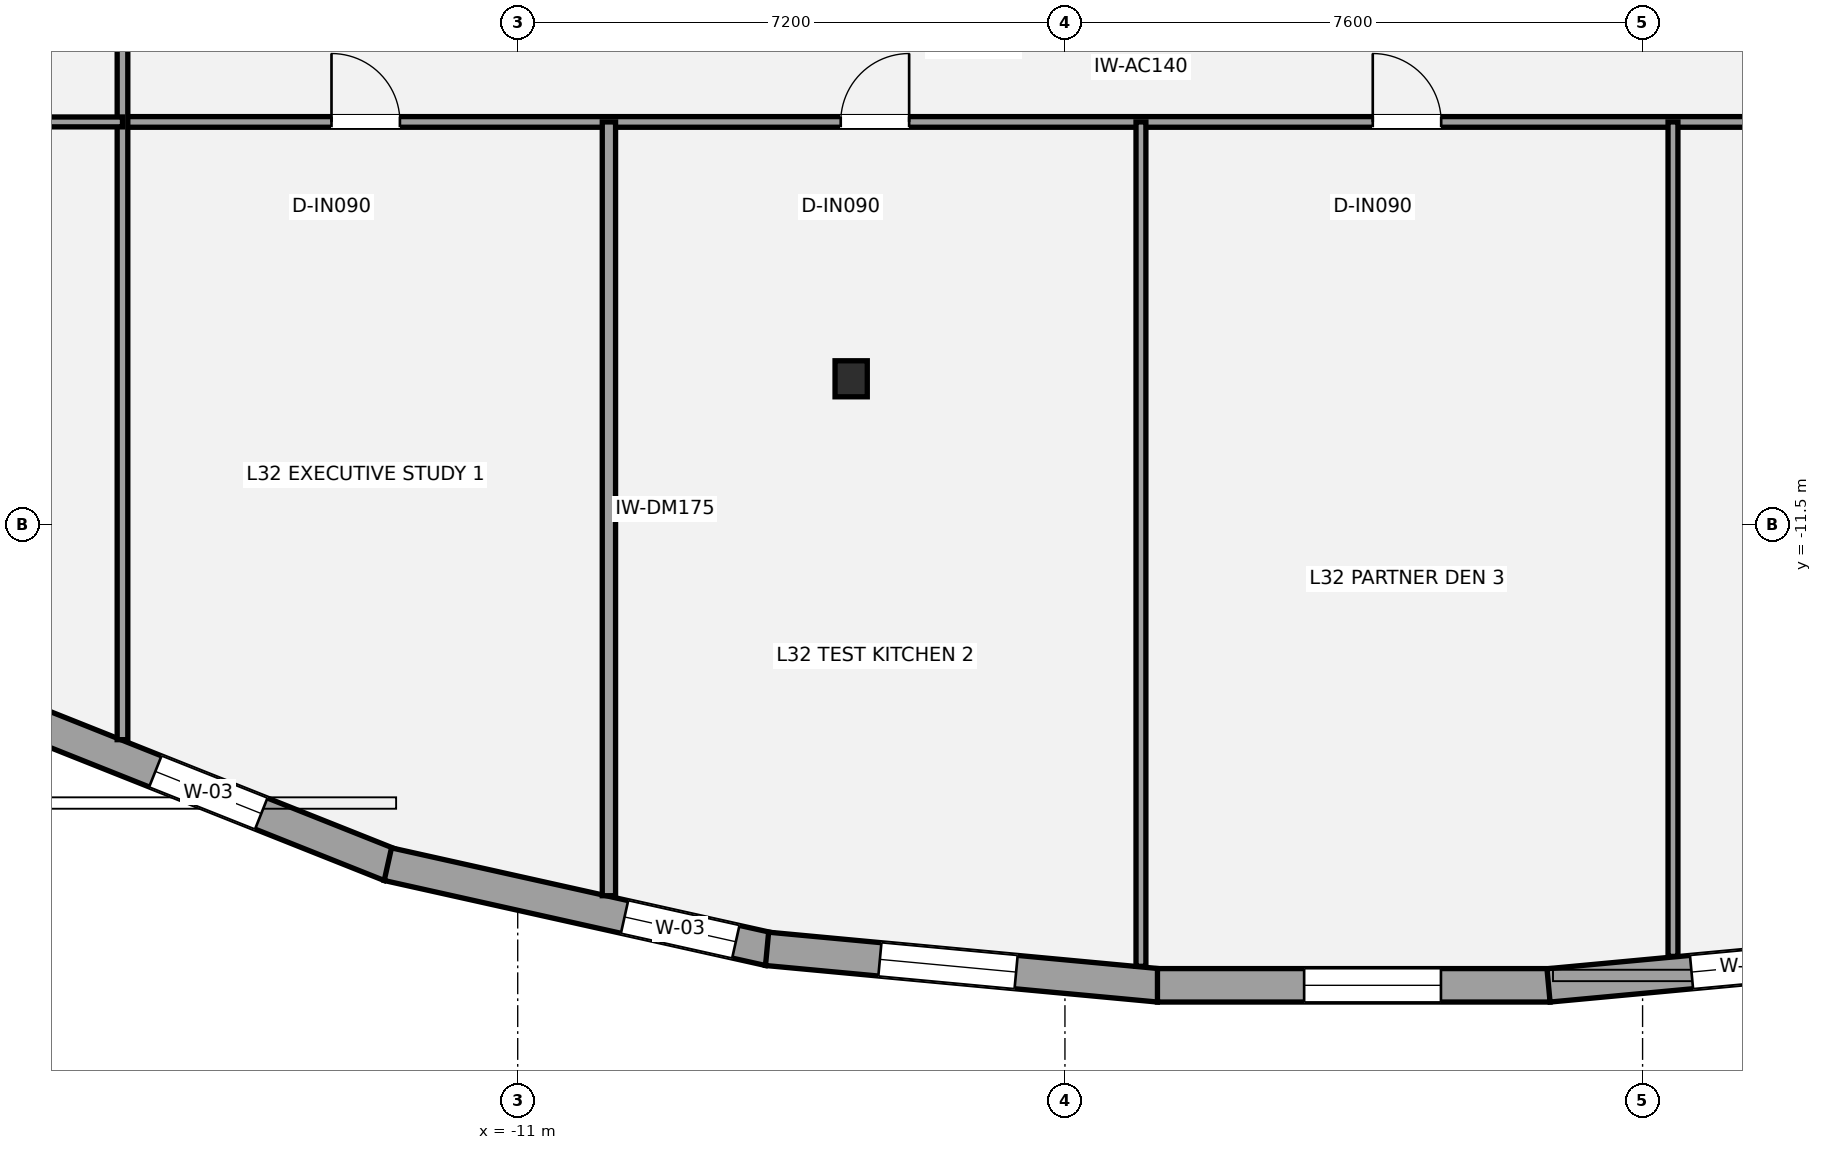
"""IFC4 building model, lengths in metres.
Left out: names, types, materials, properties, quantities, classifications, styles, units other than length and angle.
Written with IfcOpenShell. Run it as: python <this file> out.ifc"""

import sys

from ifc_helpers import new_model, si_unit, direction, frame, frame_2d, origin, origin_2d, place, context, subcontext, project, spatial, rectangle, i_section, extrude, element, fill, save


model = new_model("IFC4")
c1 = context("Model", 3, precision=1e-05, world=origin(), true_north=direction((0.0, 1.0)))
c2 = subcontext(c1, "Body", "Model", "MODEL_VIEW")
j1 = project(units=[si_unit("LENGTHUNIT", "METRE"), si_unit("PLANEANGLEUNIT", "RADIAN")], contexts=[c1])
p1 = place(None, origin())
s1 = spatial("IfcSite", under=j1, at=p1, CompositionType="ELEMENT")
p2 = place(p1, origin())
s2 = spatial("IfcBuilding", under=s1, at=p2, CompositionType="ELEMENT")
p3 = place(p2, frame((0.0, 0.0, 121.1)))
s3 = spatial("IfcBuildingStorey", under=s2, at=p3, CompositionType="ELEMENT", Elevation=121.1)
p4 = place(p3, frame((-6.613, -9.579, 0.0), z_axis=(0.0, 0.0, 1.0), x_axis=(1.0, 0.0, 0.0)))
e1 = element("IfcColumn", 1, at=p4, inside=s3, PredefinedType="COLUMN", context=c2, shape_type="SweptSolid", body=[
    extrude(i_section(OverallWidth=0.424, OverallDepth=0.474, WebThickness=0.048, FlangeThickness=0.077, at=origin_2d()), origin(), (0.0, 0.0, 1.0), 3.5),
])
p5 = place(p3, frame((-17.241, -14.164, 0.0), z_axis=(0.0, 0.0, 1.0), x_axis=(-0.827707240431, 0.56116015908, 0.0)))
e2 = element("IfcWall", 2, at=p5, inside=s3, PredefinedType="STANDARD", context=c2, shape_type="SweptSolid", body=[
    extrude(rectangle(XDim=4.584, YDim=0.44, at=frame_2d((2.292, 0.0))), origin(), (0.0, 0.0, 1.0), 2.528),
])
p6 = place(p5, frame((0.995, 0.0, 0.65)))
e3 = element("IfcOpeningElement", 3, at=p6, cuts=e2, PredefinedType="OPENING", context=c2, shape_type="SweptSolid", body=[
    extrude(rectangle(XDim=1.8, YDim=1.7, at=frame_2d((0.9, 0.85))), frame((0.0, 0.23, 0.0), z_axis=(0.0, -1.0, 0.0), x_axis=(1.0, 0.0, 0.0)), (0.0, 0.0, 1.0), 0.46),
])
p7 = place(p3, frame((-12.675, -15.976, 0.0), z_axis=(0.0, 0.0, 1.0), x_axis=(-0.929089765506, 0.369854305953, 0.0)))
e4 = element("IfcWall", 4, at=p7, inside=s3, PredefinedType="STANDARD", context=c2, shape_type="SweptSolid", body=[
    extrude(rectangle(XDim=4.961, YDim=0.44, at=frame_2d((2.48, 0.0))), origin(), (0.0, 0.0, 1.0), 2.528),
])
p8 = place(p7, frame((1.829, 0.0, 0.65)))
e5 = element("IfcOpeningElement", 5, at=p8, cuts=e4, PredefinedType="OPENING", context=c2, shape_type="SweptSolid", body=[
    extrude(rectangle(XDim=1.5, YDim=1.7, at=frame_2d((0.75, 0.85))), frame((0.0, 0.23, 0.0), z_axis=(0.0, -1.0, 0.0), x_axis=(1.0, 0.0, 0.0)), (0.0, 0.0, 1.0), 0.46),
])
p9 = place(p3, frame((-7.692, -17.083, 0.0), z_axis=(0.0, 0.0, 1.0), x_axis=(-0.976058355685, 0.217508818896, 0.0)))
e6 = element("IfcWall", 6, at=p9, inside=s3, PredefinedType="STANDARD", context=c2, shape_type="SweptSolid", body=[
    extrude(rectangle(XDim=5.14, YDim=0.44, at=frame_2d((2.57, 0.0))), origin(), (0.0, 0.0, 1.0), 2.528),
])
p10 = place(p9, frame((0.449, 0.0, 0.65)))
e7 = element("IfcOpeningElement", 7, at=p10, cuts=e6, PredefinedType="OPENING", context=c2, shape_type="SweptSolid", body=[
    extrude(rectangle(XDim=1.5, YDim=1.7, at=frame_2d((0.75, 0.85))), frame((0.0, 0.23, 0.0), z_axis=(0.0, -1.0, 0.0), x_axis=(1.0, 0.0, 0.0)), (0.0, 0.0, 1.0), 0.46),
])
p11 = place(p3, frame((-2.562, -17.56, 0.0), z_axis=(0.0, 0.0, 1.0), x_axis=(-0.995683099415, 0.092817916047, 0.0)))
e8 = element("IfcWall", 8, at=p11, inside=s3, PredefinedType="STANDARD", context=c2, shape_type="SweptSolid", body=[
    extrude(rectangle(XDim=5.179, YDim=0.44, at=frame_2d((2.59, 0.0))), origin(), (0.0, 0.0, 1.0), 2.528),
])
p12 = place(p11, frame((1.888, 0.0, 0.65)))
e9 = element("IfcOpeningElement", 9, at=p12, cuts=e8, PredefinedType="OPENING", context=c2, shape_type="SweptSolid", body=[
    extrude(rectangle(XDim=1.8, YDim=1.7, at=frame_2d((0.9, 0.85))), frame((0.0, 0.23, 0.0), z_axis=(0.0, -1.0, 0.0), x_axis=(1.0, 0.0, 0.0)), (0.0, 0.0, 1.0), 0.46),
])
p13 = place(p3, frame((2.583, -17.559, 0.0), z_axis=(0.0, 0.0, 1.0), x_axis=(-1.0, 0.0, 0.0)))
e10 = element("IfcWall", 10, at=p13, inside=s3, PredefinedType="STANDARD", context=c2, shape_type="SweptSolid", body=[
    extrude(rectangle(XDim=5.166, YDim=0.44, at=frame_2d((2.583, 0.0))), origin(), (0.0, 0.0, 1.0), 2.528),
])
p14 = place(p13, frame((1.436, 0.0, 0.65)))
e11 = element("IfcOpeningElement", 11, at=p14, cuts=e10, PredefinedType="OPENING", context=c2, shape_type="SweptSolid", body=[
    extrude(rectangle(XDim=1.8, YDim=1.7, at=frame_2d((0.9, 0.85))), frame((0.0, 0.23, 0.0), z_axis=(0.0, -1.0, 0.0), x_axis=(1.0, 0.0, 0.0)), (0.0, 0.0, 1.0), 0.46),
])
p15 = place(p3, frame((7.719, -17.079, 0.0), z_axis=(0.0, 0.0, 1.0), x_axis=(-0.995683099415, -0.092817916047, 0.0)))
e12 = element("IfcWall", 12, at=p15, inside=s3, PredefinedType="STANDARD", context=c2, shape_type="SweptSolid", body=[
    extrude(rectangle(XDim=5.179, YDim=0.44, at=frame_2d((2.59, 0.0))), origin(), (0.0, 0.0, 1.0), 2.528),
])
p16 = place(p15, frame((1.89, 0.0, 0.85)))
e13 = element("IfcOpeningElement", 13, at=p16, cuts=e12, PredefinedType="OPENING", context=c2, shape_type="SweptSolid", body=[
    extrude(rectangle(XDim=1.4, YDim=1.55, at=frame_2d((0.7, 0.775))), frame((0.0, 0.23, 0.0), z_axis=(0.0, -1.0, 0.0), x_axis=(1.0, 0.0, 0.0)), (0.0, 0.0, 1.0), 0.46),
])
p17 = place(p3, frame((-16.2, -6.2, 0.0), z_axis=(0.0, 0.0, 1.0), x_axis=(1.0, 0.0, 0.0)))
e14 = element("IfcWall", 14, at=p17, inside=s3, PredefinedType="PARTITIONING", context=c2, shape_type="SweptSolid", body=[
    extrude(rectangle(XDim=34.0, YDim=0.14, at=frame_2d((17.0, 0.0))), origin(), (0.0, 0.0, 1.0), 2.688),
])
p18 = place(p17, frame((2.75, 0.0, 0.0)))
e15 = element("IfcOpeningElement", 15, at=p18, cuts=e14, PredefinedType="OPENING", context=c2, shape_type="SweptSolid", body=[
    extrude(rectangle(XDim=0.9, YDim=2.1, at=frame_2d((0.45, 1.05))), frame((0.0, 0.08, 0.0), z_axis=(0.0, -1.0, 0.0), x_axis=(1.0, 0.0, 0.0)), (0.0, 0.0, 1.0), 0.16),
])
p19 = place(p17, frame((9.45, 0.0, 0.0)))
e16 = element("IfcOpeningElement", 16, at=p19, cuts=e14, PredefinedType="OPENING", context=c2, shape_type="SweptSolid", body=[
    extrude(rectangle(XDim=0.9, YDim=2.1, at=frame_2d((0.45, 1.05))), frame((0.0, 0.08, 0.0), z_axis=(0.0, -1.0, 0.0), x_axis=(1.0, 0.0, 0.0)), (0.0, 0.0, 1.0), 0.16),
])
p20 = place(p17, frame((16.45, 0.0, 0.0)))
e17 = element("IfcOpeningElement", 17, at=p20, cuts=e14, PredefinedType="OPENING", context=c2, shape_type="SweptSolid", body=[
    extrude(rectangle(XDim=0.9, YDim=2.1, at=frame_2d((0.45, 1.05))), frame((0.0, 0.08, 0.0), z_axis=(0.0, -1.0, 0.0), x_axis=(1.0, 0.0, 0.0)), (0.0, 0.0, 1.0), 0.16),
])
p21 = place(p17, frame((22.95, 0.0, 0.0)))
e18 = element("IfcOpeningElement", 18, at=p21, cuts=e14, PredefinedType="OPENING", context=c2, shape_type="SweptSolid", body=[
    extrude(rectangle(XDim=0.9, YDim=2.1, at=frame_2d((0.45, 1.05))), frame((0.0, 0.08, 0.0), z_axis=(0.0, -1.0, 0.0), x_axis=(1.0, 0.0, 0.0)), (0.0, 0.0, 1.0), 0.16),
])
p22 = place(p17, frame((29.45, 0.0, 0.0)))
e19 = element("IfcOpeningElement", 19, at=p22, cuts=e14, PredefinedType="OPENING", context=c2, shape_type="SweptSolid", body=[
    extrude(rectangle(XDim=1.5, YDim=2.15, at=frame_2d((0.75, 1.075))), frame((0.0, 0.08, 0.0), z_axis=(0.0, -1.0, 0.0), x_axis=(1.0, 0.0, 0.0)), (0.0, 0.0, 1.0), 0.16),
])
p23 = place(p3, frame((-16.2, -14.327, 0.0), z_axis=(0.0, 0.0, 1.0), x_axis=(0.0, 1.0, 0.0)))
e20 = element("IfcWall", 20, at=p23, inside=s3, PredefinedType="PARTITIONING", context=c2, shape_type="SweptSolid", body=[
    extrude(rectangle(XDim=21.877, YDim=0.14, at=frame_2d((10.938, 0.0))), origin(), (0.0, 0.0, 1.0), 2.763),
])
p24 = place(p23, frame((10.177, 0.0, 0.0)))
e21 = element("IfcOpeningElement", 21, at=p24, cuts=e20, PredefinedType="OPENING", context=c2, shape_type="SweptSolid", body=[
    extrude(rectangle(XDim=0.9, YDim=2.1, at=frame_2d((0.45, 1.05))), frame((0.0, 0.08, 0.0), z_axis=(0.0, -1.0, 0.0), x_axis=(1.0, 0.0, 0.0)), (0.0, 0.0, 1.0), 0.16),
])
p25 = place(p23, frame((14.978, 0.0, 0.0)))
e22 = element("IfcOpeningElement", 22, at=p25, cuts=e20, PredefinedType="OPENING", context=c2, shape_type="SweptSolid", body=[
    extrude(rectangle(XDim=0.9, YDim=2.1, at=frame_2d((0.45, 1.05))), frame((0.0, 0.08, 0.0), z_axis=(0.0, -1.0, 0.0), x_axis=(1.0, 0.0, 0.0)), (0.0, 0.0, 1.0), 0.16),
])
p26 = place(p23, frame((19.353, 0.0, 0.0)))
e23 = element("IfcOpeningElement", 23, at=p26, cuts=e20, PredefinedType="OPENING", context=c2, shape_type="SweptSolid", body=[
    extrude(rectangle(XDim=0.9, YDim=2.1, at=frame_2d((0.45, 1.05))), frame((0.0, 0.08, 0.0), z_axis=(0.0, -1.0, 0.0), x_axis=(1.0, 0.0, 0.0)), (0.0, 0.0, 1.0), 0.16),
])
p27 = place(p3, frame((-9.8, -16.38, 0.0), z_axis=(0.0, 0.0, 1.0), x_axis=(0.0, 1.0, 0.0)))
e24 = element("IfcWall", 24, at=p27, inside=s3, PredefinedType="PARTITIONING", context=c2, shape_type="SweptSolid", body=[
    extrude(rectangle(XDim=10.18, YDim=0.175, at=frame_2d((5.09, 0.0))), origin(), (0.0, 0.0, 1.0), 3.31),
])
p28 = place(p3, frame((-2.8, -17.309, 0.0), z_axis=(0.0, 0.0, 1.0), x_axis=(0.0, 1.0, 0.0)))
e25 = element("IfcWall", 25, at=p28, inside=s3, PredefinedType="PARTITIONING", context=c2, shape_type="SweptSolid", body=[
    extrude(rectangle(XDim=11.109, YDim=0.13, at=frame_2d((5.554, 0.0))), origin(), (0.0, 0.0, 1.0), 2.763),
])
p29 = place(p3, frame((4.2, -17.178, 0.0), z_axis=(0.0, 0.0, 1.0), x_axis=(0.0, 1.0, 0.0)))
e26 = element("IfcWall", 26, at=p29, inside=s3, PredefinedType="PARTITIONING", context=c2, shape_type="SweptSolid", body=[
    extrude(rectangle(XDim=10.978, YDim=0.13, at=frame_2d((5.489, 0.0))), origin(), (0.0, 0.0, 1.0), 2.763),
])
p30 = place(p3, frame((-24.554, -6.2, 0.0), z_axis=(0.0, 0.0, 1.0), x_axis=(1.0, 0.0, 0.0)))
e27 = element("IfcWall", 27, at=p30, inside=s3, PredefinedType="PARTITIONING", context=c2, shape_type="SweptSolid", body=[
    extrude(rectangle(XDim=8.354, YDim=0.13, at=frame_2d((4.177, 0.0))), origin(), (0.0, 0.0, 1.0), 2.688),
])
p31 = place(p30, frame((0.99, 0.0, 0.0)))
e28 = element("IfcOpeningElement", 28, at=p31, cuts=e27, PredefinedType="OPENING", context=c2, shape_type="SweptSolid", body=[
    extrude(rectangle(XDim=0.9, YDim=2.1, at=frame_2d((0.45, 1.05))), frame((0.0, 0.075, 0.0), z_axis=(0.0, -1.0, 0.0), x_axis=(1.0, 0.0, 0.0)), (0.0, 0.0, 1.0), 0.15),
])
p32 = place(p8, origin())
e29 = element("IfcWindow", 29, at=p32, inside=s3, PartitioningType="SINGLE_PANEL", PredefinedType="WINDOW", context=c2, shape_type="SweptSolid", body=[
    extrude(rectangle(XDim=1.5, YDim=1.7, at=frame_2d((0.75, 0.85))), frame((0.0, -0.01, 0.0), z_axis=(0.0, -1.0, 0.0), x_axis=(1.0, 0.0, 0.0)), (0.0, 0.0, 1.0), 0.06),
])
fill(e5, e29)
p33 = place(p10, origin())
e30 = element("IfcWindow", 30, at=p33, inside=s3, PartitioningType="SINGLE_PANEL", PredefinedType="WINDOW", context=c2, shape_type="SweptSolid", body=[
    extrude(rectangle(XDim=1.5, YDim=1.7, at=frame_2d((0.75, 0.85))), frame((0.0, -0.01, 0.0), z_axis=(0.0, -1.0, 0.0), x_axis=(1.0, 0.0, 0.0)), (0.0, 0.0, 1.0), 0.06),
])
fill(e7, e30)
p34 = place(p12, origin())
e31 = element("IfcWindow", 31, at=p34, inside=s3, PartitioningType="SINGLE_PANEL", PredefinedType="WINDOW", context=c2, shape_type="SweptSolid", body=[
    extrude(rectangle(XDim=1.8, YDim=1.7, at=frame_2d((0.9, 0.85))), frame((0.0, -0.01, 0.0), z_axis=(0.0, -1.0, 0.0), x_axis=(1.0, 0.0, 0.0)), (0.0, 0.0, 1.0), 0.06),
])
fill(e9, e31)
p35 = place(p14, origin())
e32 = element("IfcWindow", 32, at=p35, inside=s3, PartitioningType="SINGLE_PANEL", PredefinedType="WINDOW", context=c2, shape_type="SweptSolid", body=[
    extrude(rectangle(XDim=1.8, YDim=1.7, at=frame_2d((0.9, 0.85))), frame((0.0, -0.01, 0.0), z_axis=(0.0, -1.0, 0.0), x_axis=(1.0, 0.0, 0.0)), (0.0, 0.0, 1.0), 0.06),
])
fill(e11, e32)
p36 = place(p16, origin())
e33 = element("IfcWindow", 33, at=p36, inside=s3, PartitioningType="SINGLE_PANEL", PredefinedType="WINDOW", context=c2, shape_type="SweptSolid", body=[
    extrude(rectangle(XDim=1.4, YDim=1.55, at=frame_2d((0.7, 0.775))), frame((0.0, -0.01, 0.0), z_axis=(0.0, -1.0, 0.0), x_axis=(1.0, 0.0, 0.0)), (0.0, 0.0, 1.0), 0.06),
])
fill(e13, e33)
p37 = place(p18, origin())
e34 = element("IfcDoor", 34, at=p37, inside=s3, OperationType="SINGLE_SWING_LEFT", PredefinedType="DOOR", context=c2, shape_type="SweptSolid", body=[
    extrude(rectangle(XDim=0.9, YDim=2.1, at=frame_2d((0.45, 1.05))), frame((0.0, 0.025, 0.0), z_axis=(0.0, -1.0, 0.0), x_axis=(1.0, 0.0, 0.0)), (0.0, 0.0, 1.0), 0.05),
])
fill(e15, e34)
p38 = place(p19, origin())
e35 = element("IfcDoor", 35, at=p38, inside=s3, OperationType="SINGLE_SWING_RIGHT", PredefinedType="DOOR", context=c2, shape_type="SweptSolid", body=[
    extrude(rectangle(XDim=0.9, YDim=2.1, at=frame_2d((0.45, 1.05))), frame((0.0, 0.025, 0.0), z_axis=(0.0, -1.0, 0.0), x_axis=(1.0, 0.0, 0.0)), (0.0, 0.0, 1.0), 0.05),
])
fill(e16, e35)
p39 = place(p20, origin())
e36 = element("IfcDoor", 36, at=p39, inside=s3, OperationType="SINGLE_SWING_LEFT", PredefinedType="DOOR", context=c2, shape_type="SweptSolid", body=[
    extrude(rectangle(XDim=0.9, YDim=2.1, at=frame_2d((0.45, 1.05))), frame((0.0, 0.025, 0.0), z_axis=(0.0, -1.0, 0.0), x_axis=(1.0, 0.0, 0.0)), (0.0, 0.0, 1.0), 0.05),
])
fill(e17, e36)
save(model, sys.argv[1])
